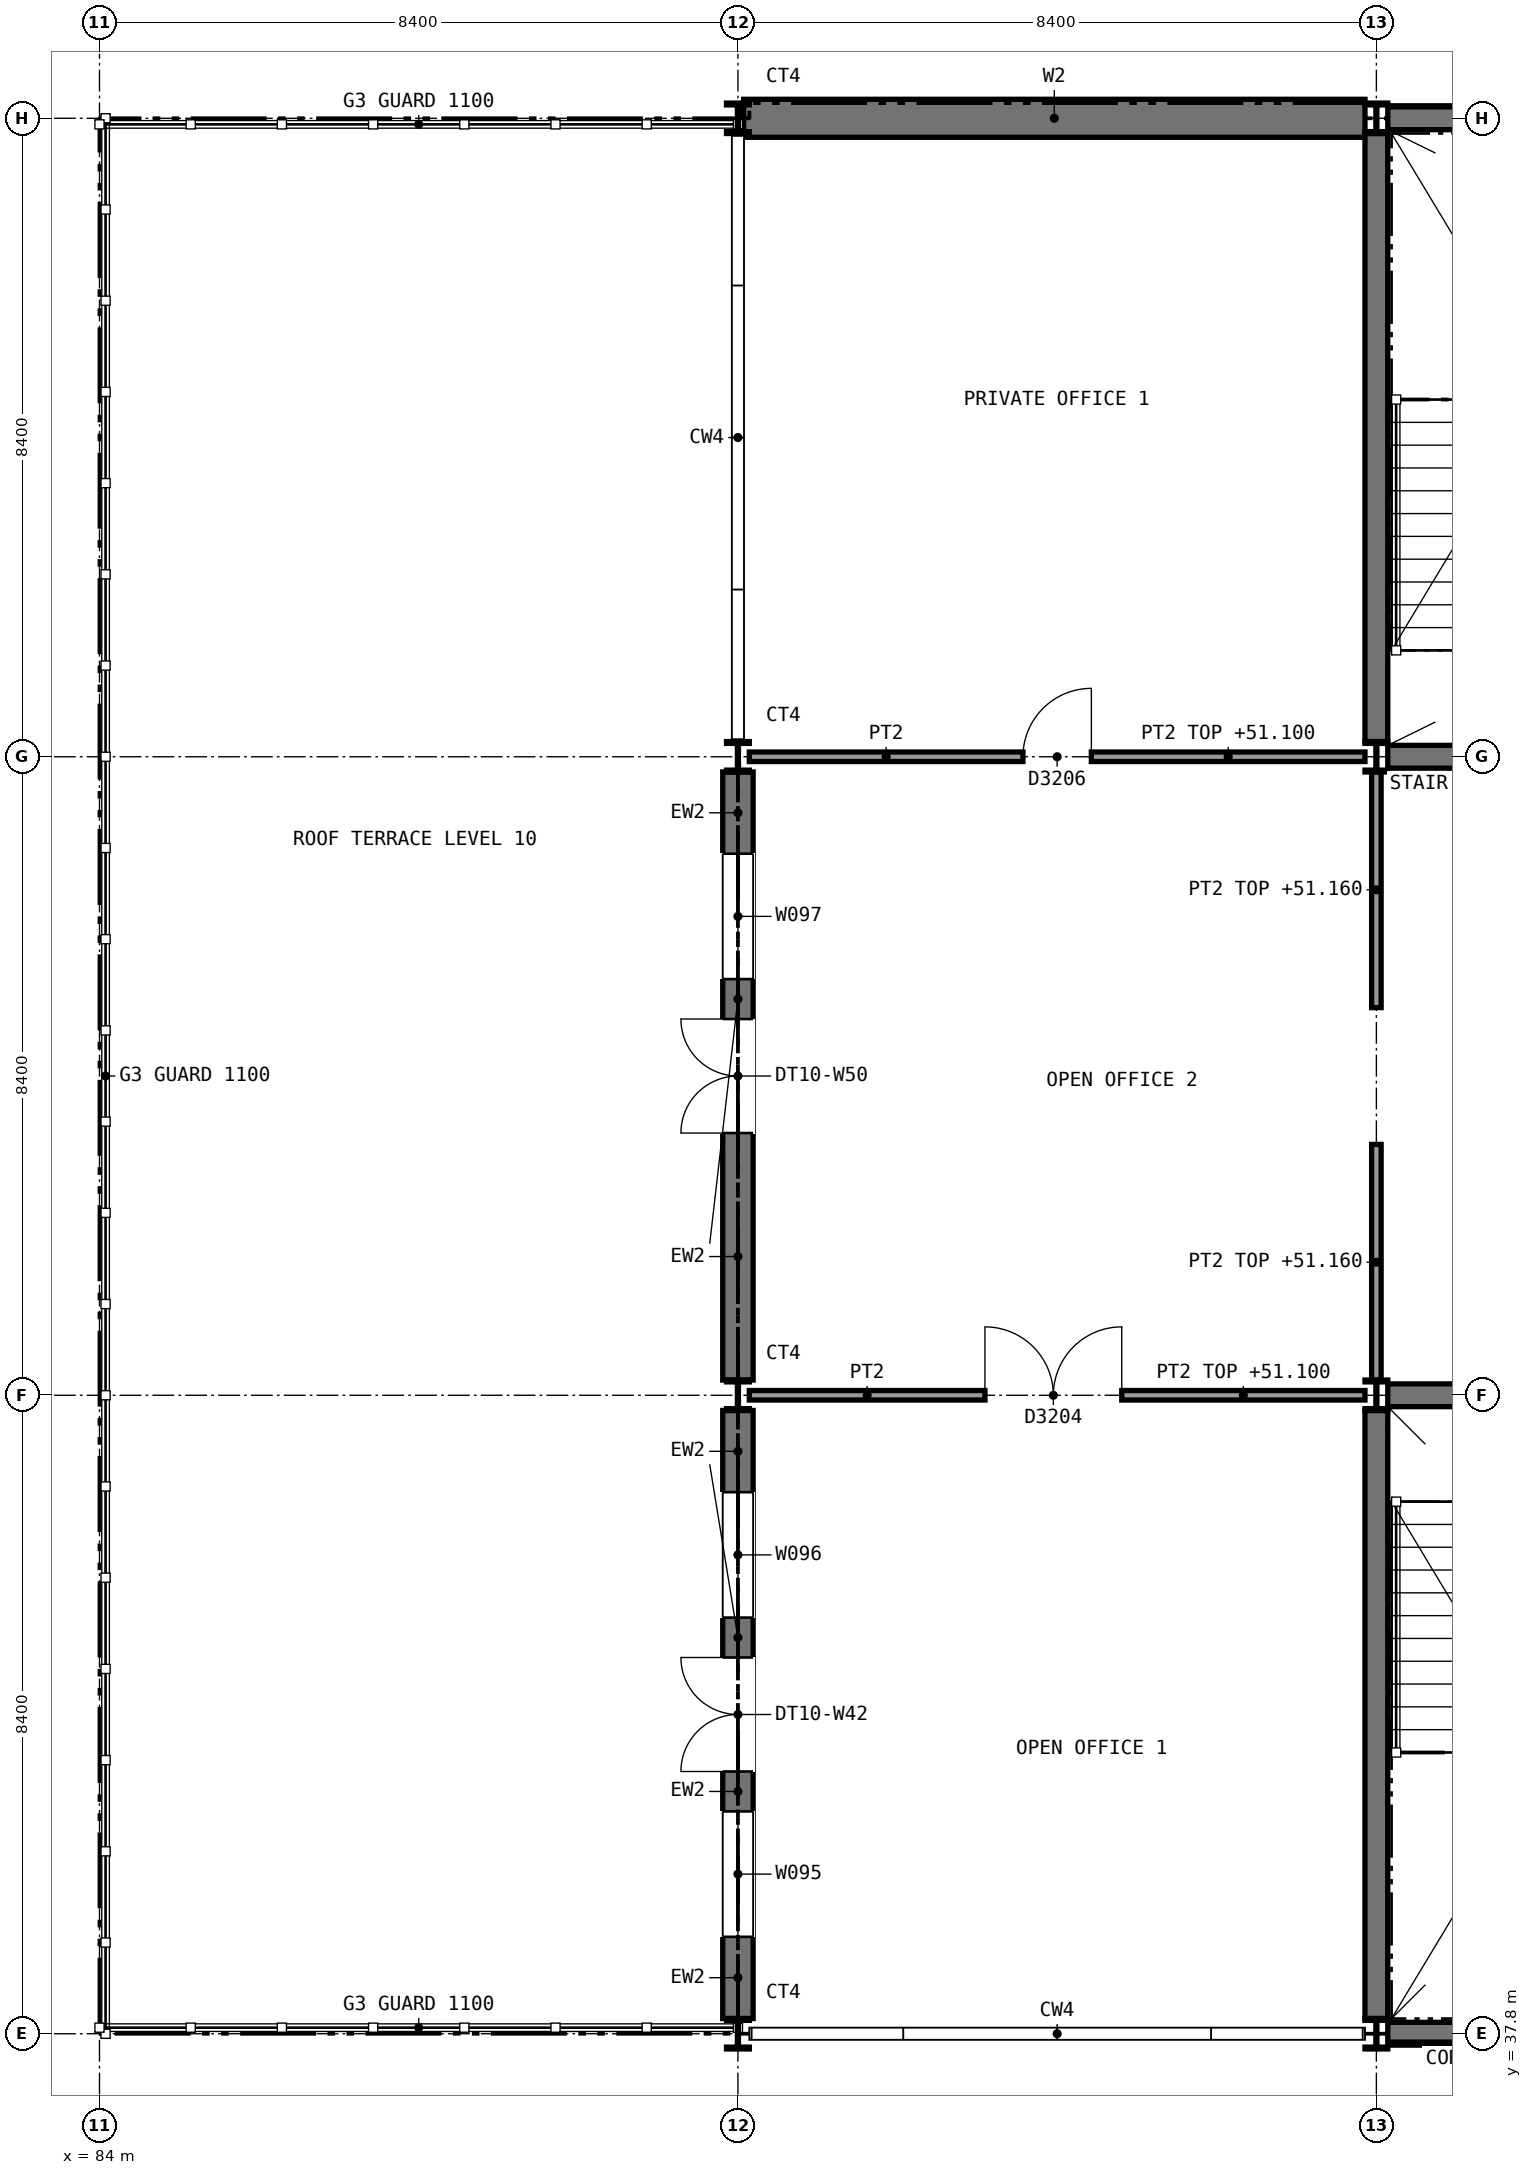
"""IFC4 building model, lengths in metres.
Left out: names, types, materials, properties, quantities, classifications, styles, units other than length and angle.
Written with IfcOpenShell. Run it as: python <this file> out.ifc"""

import sys

from ifc_helpers import new_model, si_unit, direction, frame, frame_2d, origin, origin_2d, place, context, subcontext, project, spatial, rectangle, i_section, extrude, element, fill, save


model = new_model("IFC4")
c1 = context("Model", 3, precision=1e-05, world=origin(), true_north=direction((0.0, 1.0)))
c2 = subcontext(c1, "Body", "Model", "MODEL_VIEW")
j1 = project(units=[si_unit("LENGTHUNIT", "METRE"), si_unit("PLANEANGLEUNIT", "RADIAN")], contexts=[c1])
p1 = place(None, origin())
s1 = spatial("IfcSite", under=j1, at=p1, CompositionType="ELEMENT")
p2 = place(p1, origin())
s2 = spatial("IfcBuilding", under=s1, at=p2, CompositionType="ELEMENT")
p3 = place(p2, frame((0.0, 0.0, 47.6)))
s3 = spatial("IfcBuildingStorey", under=s2, at=p3, CompositionType="ELEMENT", Elevation=47.6)
p4 = place(p3, frame((92.475, 63.0, 0.0), z_axis=(0.0, 0.0, 1.0), x_axis=(1.0, 0.0, 0.0)))
e1 = element("IfcWall", 1, at=p4, inside=s3, PredefinedType="SHEAR", context=c2, shape_type="SweptSolid", body=[
    extrude(rectangle(XDim=8.175, YDim=0.5, at=frame_2d((4.088, 0.0))), origin(), (0.0, 0.0, 1.0), 3.85),
])
p5 = place(p3, frame((100.95, 63.0, 0.0), z_axis=(0.0, 0.0, 1.0), x_axis=(1.0, 0.0, 0.0)))
e2 = element("IfcWall", 2, at=p5, inside=s3, PredefinedType="SHEAR", context=c2, shape_type="SweptSolid", body=[
    extrude(rectangle(XDim=16.45, YDim=0.3, at=frame_2d((8.225, 0.0))), origin(), (0.0, 0.0, 1.0), 3.85),
])
p6 = place(p3, frame((100.95, 54.6, 0.0), z_axis=(0.0, 0.0, 1.0), x_axis=(1.0, 0.0, 0.0)))
e3 = element("IfcWall", 3, at=p6, inside=s3, PredefinedType="SHEAR", context=c2, shape_type="SweptSolid", body=[
    extrude(rectangle(XDim=16.45, YDim=0.3, at=frame_2d((8.225, 0.0))), origin(), (0.0, 0.0, 1.0), 3.85),
])
p7 = place(p6, frame((1.15, 0.0, 0.0)))
e4 = element("IfcOpeningElement", 4, at=p7, cuts=e3, PredefinedType="OPENING", context=c2, shape_type="SweptSolid", body=[
    extrude(rectangle(XDim=1.8, YDim=2.1, at=frame_2d((0.9, 1.05))), frame((0.0, 0.16, 0.0), z_axis=(0.0, -1.0, 0.0), x_axis=(1.0, 0.0, 0.0)), (0.0, 0.0, 1.0), 0.32),
])
p8 = place(p6, frame((13.55, 0.0, 0.0)))
e5 = element("IfcOpeningElement", 5, at=p8, cuts=e3, PredefinedType="OPENING", context=c2, shape_type="SweptSolid", body=[
    extrude(rectangle(XDim=1.8, YDim=2.1, at=frame_2d((0.9, 1.05))), frame((0.0, 0.16, 0.0), z_axis=(0.0, -1.0, 0.0), x_axis=(1.0, 0.0, 0.0)), (0.0, 0.0, 1.0), 0.32),
])
p9 = place(p6, frame((7.05, 0.0, 0.0)))
e6 = element("IfcOpeningElement", 6, at=p9, cuts=e3, PredefinedType="OPENING", context=c2, shape_type="SweptSolid", body=[
    extrude(rectangle(XDim=2.4, YDim=2.4, at=frame_2d((1.2, 1.2))), frame((0.0, 0.16, 0.0), z_axis=(0.0, -1.0, 0.0), x_axis=(1.0, 0.0, 0.0)), (0.0, 0.0, 1.0), 0.32),
])
p10 = place(p3, frame((100.8, 54.8, 0.0), z_axis=(0.0, 0.0, 1.0), x_axis=(0.0, 1.0, 0.0)))
e7 = element("IfcWall", 7, at=p10, inside=s3, PredefinedType="SHEAR", context=c2, shape_type="SweptSolid", body=[
    extrude(rectangle(XDim=8.0, YDim=0.3, at=frame_2d((4.0, 0.0))), origin(), (0.0, 0.0, 1.0), 3.85),
])
p11 = place(p3, frame((100.95, 37.8, 0.0), z_axis=(0.0, 0.0, 1.0), x_axis=(1.0, 0.0, 0.0)))
e8 = element("IfcWall", 8, at=p11, inside=s3, PredefinedType="SHEAR", context=c2, shape_type="SweptSolid", body=[
    extrude(rectangle(XDim=8.1, YDim=0.3, at=frame_2d((4.05, 0.0))), origin(), (0.0, 0.0, 1.0), 3.85),
])
p12 = place(p3, frame((100.95, 46.2, 0.0), z_axis=(0.0, 0.0, 1.0), x_axis=(1.0, 0.0, 0.0)))
e9 = element("IfcWall", 9, at=p12, inside=s3, PredefinedType="SHEAR", context=c2, shape_type="SweptSolid", body=[
    extrude(rectangle(XDim=8.1, YDim=0.3, at=frame_2d((4.05, 0.0))), origin(), (0.0, 0.0, 1.0), 3.85),
])
p13 = place(p12, frame((1.15, 0.0, 0.0)))
e10 = element("IfcOpeningElement", 10, at=p13, cuts=e9, PredefinedType="OPENING", context=c2, shape_type="SweptSolid", body=[
    extrude(rectangle(XDim=1.8, YDim=2.1, at=frame_2d((0.9, 1.05))), frame((0.0, 0.16, 0.0), z_axis=(0.0, -1.0, 0.0), x_axis=(1.0, 0.0, 0.0)), (0.0, 0.0, 1.0), 0.32),
])
p14 = place(p12, frame((5.6, 0.0, 0.0)))
e11 = element("IfcOpeningElement", 11, at=p14, cuts=e9, PredefinedType="OPENING", context=c2, shape_type="SweptSolid", body=[
    extrude(rectangle(XDim=1.2, YDim=2.1, at=frame_2d((0.6, 1.05))), frame((0.0, 0.16, 0.0), z_axis=(0.0, -1.0, 0.0), x_axis=(1.0, 0.0, 0.0)), (0.0, 0.0, 1.0), 0.32),
])
p15 = place(p3, frame((100.8, 38.0, 0.0), z_axis=(0.0, 0.0, 1.0), x_axis=(0.0, 1.0, 0.0)))
e12 = element("IfcWall", 12, at=p15, inside=s3, PredefinedType="SHEAR", context=c2, shape_type="SweptSolid", body=[
    extrude(rectangle(XDim=8.0, YDim=0.3, at=frame_2d((4.0, 0.0))), origin(), (0.0, 0.0, 1.0), 3.85),
])
for number, where, z_axis, x_axis in (
    (13, (92.4, 37.8, 0.0), (0.0, 0.0, 1.0), (1.0, 0.0, 0.0)),
    (14, (92.4, 46.2, 0.0), (0.0, 0.0, 1.0), (1.0, 0.0, 0.0)),
    (15, (92.4, 54.6, 0.0), (0.0, 0.0, 1.0), (1.0, 0.0, 0.0)),
    (16, (92.4, 63.0, 0.0), (0.0, 0.0, 1.0), (1.0, 0.0, 0.0)),
    (17, (100.8, 37.8, 0.0), (0.0, 0.0, 1.0), (1.0, 0.0, 0.0)),
    (18, (100.8, 46.2, 0.0), (0.0, 0.0, 1.0), (1.0, 0.0, 0.0)),
    (19, (100.8, 54.6, 0.0), (0.0, 0.0, 1.0), (1.0, 0.0, 0.0)),
    (20, (100.8, 63.0, 0.0), (0.0, 0.0, 1.0), (1.0, 0.0, 0.0)),
):
    element("IfcColumn", number, at=place(p3, frame(where, z_axis=z_axis, x_axis=x_axis)), inside=s3, PredefinedType="COLUMN", context=c2, shape_type="SweptSolid", body=[
        extrude(i_section(OverallWidth=0.3, OverallDepth=0.4, WebThickness=0.013, FlangeThickness=0.024, FilletRadius=0.027, at=origin_2d()), origin(), (0.0, 0.0, 1.0), 4.0),
    ])
p16 = place(p3, frame((92.55, 46.2, 0.0), z_axis=(0.0, 0.0, 1.0), x_axis=(1.0, 0.0, 0.0)))
e21 = element("IfcWall", 21, at=p16, inside=s3, PredefinedType="PARTITIONING", context=c2, shape_type="SweptSolid", body=[
    extrude(rectangle(XDim=8.1, YDim=0.125, at=frame_2d((4.05, 0.0))), origin(), (0.0, 0.0, 1.0), 3.5),
])
p17 = place(p16, frame((3.1, 0.0, 0.0)))
e22 = element("IfcOpeningElement", 22, at=p17, cuts=e21, PredefinedType="OPENING", context=c2, shape_type="SweptSolid", body=[
    extrude(rectangle(XDim=1.8, YDim=2.1, at=frame_2d((0.9, 1.05))), frame((0.0, 0.073, 0.0), z_axis=(0.0, -1.0, 0.0), x_axis=(1.0, 0.0, 0.0)), (0.0, 0.0, 1.0), 0.145),
])
for number, where, z_axis, x_axis in (
    (23, (100.8, 46.4, 0.0), (0.0, 0.0, 1.0), (0.0, 1.0, 0.0)),
    (24, (100.8, 51.3, 0.0), (0.0, 0.0, 1.0), (0.0, 1.0, 0.0)),
):
    element("IfcWall", number, at=place(p3, frame(where, z_axis=z_axis, x_axis=x_axis)), inside=s3, PredefinedType="PARTITIONING", context=c2, shape_type="SweptSolid", body=[
        extrude(rectangle(XDim=3.1, YDim=0.125, at=frame_2d((1.55, 0.0))), origin(), (0.0, 0.0, 1.0), 3.56),
    ])
p18 = place(p3, frame((92.55, 54.6, 0.0), z_axis=(0.0, 0.0, 1.0), x_axis=(1.0, 0.0, 0.0)))
e25 = element("IfcWall", 25, at=p18, inside=s3, PredefinedType="PARTITIONING", context=c2, shape_type="SweptSolid", body=[
    extrude(rectangle(XDim=8.1, YDim=0.125, at=frame_2d((4.05, 0.0))), origin(), (0.0, 0.0, 1.0), 3.5),
])
p19 = place(p18, frame((3.6, 0.0, 0.0)))
e26 = element("IfcOpeningElement", 26, at=p19, cuts=e25, PredefinedType="OPENING", context=c2, shape_type="SweptSolid", body=[
    extrude(rectangle(XDim=0.9, YDim=2.1, at=frame_2d((0.45, 1.05))), frame((0.0, 0.073, 0.0), z_axis=(0.0, -1.0, 0.0), x_axis=(1.0, 0.0, 0.0)), (0.0, 0.0, 1.0), 0.145),
])
p20 = place(p3, frame((92.4, 38.0, 0.0), z_axis=(0.0, 0.0, 1.0), x_axis=(0.0, 1.0, 0.0)))
e27 = element("IfcWall", 27, at=p20, inside=s3, PredefinedType="STANDARD", context=c2, shape_type="SweptSolid", body=[
    extrude(rectangle(XDim=8.0, YDim=0.4, at=frame_2d((4.0, 0.0))), origin(), (0.0, 0.0, 1.0), 3.85),
])
p21 = place(p20, frame((1.075, 0.0, 0.9)))
e28 = element("IfcOpeningElement", 28, at=p21, cuts=e27, PredefinedType="OPENING", context=c2, shape_type="SweptSolid", body=[
    extrude(rectangle(XDim=1.65, YDim=2.4, at=frame_2d((0.825, 1.2))), frame((0.0, 0.21, 0.0), z_axis=(0.0, -1.0, 0.0), x_axis=(1.0, 0.0, 0.0)), (0.0, 0.0, 1.0), 0.42),
])
p22 = place(p20, frame((5.275, 0.0, 0.9)))
e29 = element("IfcOpeningElement", 29, at=p22, cuts=e27, PredefinedType="OPENING", context=c2, shape_type="SweptSolid", body=[
    extrude(rectangle(XDim=1.65, YDim=2.4, at=frame_2d((0.825, 1.2))), frame((0.0, 0.21, 0.0), z_axis=(0.0, -1.0, 0.0), x_axis=(1.0, 0.0, 0.0)), (0.0, 0.0, 1.0), 0.42),
])
p23 = place(p20, frame((3.25, 0.0, 0.0)))
e30 = element("IfcOpeningElement", 30, at=p23, cuts=e27, PredefinedType="OPENING", context=c2, shape_type="SweptSolid", body=[
    extrude(rectangle(XDim=1.5, YDim=2.4, at=frame_2d((0.75, 1.2))), frame((0.0, 0.21, 0.0), z_axis=(0.0, -1.0, 0.0), x_axis=(1.0, 0.0, 0.0)), (0.0, 0.0, 1.0), 0.42),
])
p24 = place(p3, frame((92.4, 46.4, 0.0), z_axis=(0.0, 0.0, 1.0), x_axis=(0.0, 1.0, 0.0)))
e31 = element("IfcWall", 31, at=p24, inside=s3, PredefinedType="STANDARD", context=c2, shape_type="SweptSolid", body=[
    extrude(rectangle(XDim=8.0, YDim=0.4, at=frame_2d((4.0, 0.0))), origin(), (0.0, 0.0, 1.0), 3.85),
])
p25 = place(p24, frame((5.275, 0.0, 0.9)))
e32 = element("IfcOpeningElement", 32, at=p25, cuts=e31, PredefinedType="OPENING", context=c2, shape_type="SweptSolid", body=[
    extrude(rectangle(XDim=1.65, YDim=2.4, at=frame_2d((0.825, 1.2))), frame((0.0, 0.21, 0.0), z_axis=(0.0, -1.0, 0.0), x_axis=(1.0, 0.0, 0.0)), (0.0, 0.0, 1.0), 0.42),
])
p26 = place(p24, frame((3.25, 0.0, 0.0)))
e33 = element("IfcOpeningElement", 33, at=p26, cuts=e31, PredefinedType="OPENING", context=c2, shape_type="SweptSolid", body=[
    extrude(rectangle(XDim=1.5, YDim=2.4, at=frame_2d((0.75, 1.2))), frame((0.0, 0.21, 0.0), z_axis=(0.0, -1.0, 0.0), x_axis=(1.0, 0.0, 0.0)), (0.0, 0.0, 1.0), 0.42),
])
p27 = place(p17, origin())
e34 = element("IfcDoor", 34, at=p27, inside=s3, OperationType="DOUBLE_DOOR_SINGLE_SWING", PredefinedType="DOOR", context=c2, shape_type="SweptSolid", body=[
    extrude(rectangle(XDim=1.8, YDim=2.1, at=frame_2d((0.9, 1.05))), frame((0.0, 0.025, 0.0), z_axis=(0.0, -1.0, 0.0), x_axis=(1.0, 0.0, 0.0)), (0.0, 0.0, 1.0), 0.05),
])
fill(e22, e34)
p28 = place(p19, origin())
e35 = element("IfcDoor", 35, at=p28, inside=s3, OperationType="SINGLE_SWING_RIGHT", PredefinedType="DOOR", context=c2, shape_type="SweptSolid", body=[
    extrude(rectangle(XDim=0.9, YDim=2.1, at=frame_2d((0.45, 1.05))), frame((0.0, 0.025, 0.0), z_axis=(0.0, -1.0, 0.0), x_axis=(1.0, 0.0, 0.0)), (0.0, 0.0, 1.0), 0.05),
])
fill(e26, e35)
p29 = place(p21, origin())
e36 = element("IfcWindow", 36, at=p29, inside=s3, PartitioningType="SINGLE_PANEL", PredefinedType="WINDOW", context=c2, shape_type="SweptSolid", body=[
    extrude(rectangle(XDim=1.65, YDim=2.4, at=frame_2d((0.825, 1.2))), frame((0.0, 0.03, 0.0), z_axis=(0.0, -1.0, 0.0), x_axis=(1.0, 0.0, 0.0)), (0.0, 0.0, 1.0), 0.06),
])
fill(e28, e36)
p30 = place(p22, origin())
e37 = element("IfcWindow", 37, at=p30, inside=s3, PartitioningType="SINGLE_PANEL", PredefinedType="WINDOW", context=c2, shape_type="SweptSolid", body=[
    extrude(rectangle(XDim=1.65, YDim=2.4, at=frame_2d((0.825, 1.2))), frame((0.0, 0.03, 0.0), z_axis=(0.0, -1.0, 0.0), x_axis=(1.0, 0.0, 0.0)), (0.0, 0.0, 1.0), 0.06),
])
fill(e29, e37)
p31 = place(p25, origin())
e38 = element("IfcWindow", 38, at=p31, inside=s3, PartitioningType="SINGLE_PANEL", PredefinedType="WINDOW", context=c2, shape_type="SweptSolid", body=[
    extrude(rectangle(XDim=1.65, YDim=2.4, at=frame_2d((0.825, 1.2))), frame((0.0, 0.03, 0.0), z_axis=(0.0, -1.0, 0.0), x_axis=(1.0, 0.0, 0.0)), (0.0, 0.0, 1.0), 0.06),
])
fill(e32, e38)
p32 = place(p23, origin())
e39 = element("IfcDoor", 39, at=p32, inside=s3, OperationType="DOUBLE_DOOR_SINGLE_SWING", PredefinedType="DOOR", context=c2, shape_type="SweptSolid", body=[
    extrude(rectangle(XDim=1.5, YDim=2.4, at=frame_2d((0.75, 1.2))), frame((0.0, 0.025, 0.0), z_axis=(0.0, -1.0, 0.0), x_axis=(1.0, 0.0, 0.0)), (0.0, 0.0, 1.0), 0.05),
])
fill(e30, e39)
p33 = place(p26, origin())
e40 = element("IfcDoor", 40, at=p33, inside=s3, OperationType="DOUBLE_DOOR_SINGLE_SWING", PredefinedType="DOOR", context=c2, shape_type="SweptSolid", body=[
    extrude(rectangle(XDim=1.5, YDim=2.4, at=frame_2d((0.75, 1.2))), frame((0.0, 0.025, 0.0), z_axis=(0.0, -1.0, 0.0), x_axis=(1.0, 0.0, 0.0)), (0.0, 0.0, 1.0), 0.05),
])
fill(e33, e40)
save(model, sys.argv[1])
